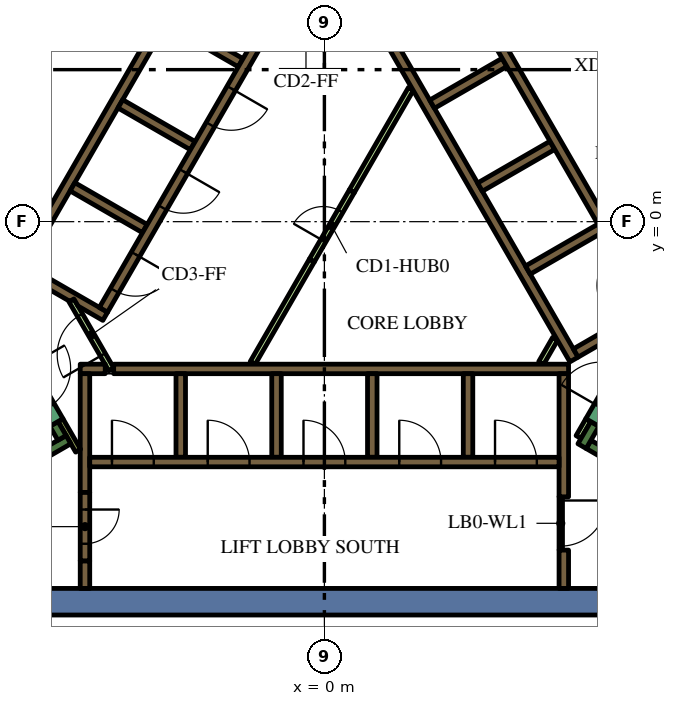
"""IFC4 building model, lengths in metres.
Left out: names, types, materials, properties, quantities, classifications, styles, units other than length and angle.
Written with IfcOpenShell. Run it as: python <this file> out.ifc"""

import sys

from ifc_helpers import new_model, si_unit, direction, frame, frame_2d, origin, place, context, subcontext, project, spatial, polyline, rectangle, outline, extrude, element, fill, save


model = new_model("IFC4")
c1 = context("Model", 3, precision=1e-05, world=origin(), true_north=direction((0.0, 1.0)))
c2 = subcontext(c1, "Body", "Model", "MODEL_VIEW")
j1 = project(units=[si_unit("LENGTHUNIT", "METRE"), si_unit("PLANEANGLEUNIT", "RADIAN")], contexts=[c1])
p1 = place(None, origin())
s1 = spatial("IfcSite", under=j1, at=p1, CompositionType="ELEMENT")
p2 = place(p1, origin())
s2 = spatial("IfcBuilding", under=s1, at=p2, CompositionType="ELEMENT")
p3 = place(p2, frame((0.0, 0.0, 231.0)))
s3 = spatial("IfcBuildingStorey", under=s2, at=p3, CompositionType="ELEMENT", Elevation=231.0)
p4 = place(p3, frame((8.904, -10.0, 0.0), z_axis=(0.0, 0.0, 1.0), x_axis=(-1.0, 0.0, 0.0)))
e1 = element("IfcWall", 1, at=p4, inside=s3, PredefinedType="SOLIDWALL", context=c2, shape_type="SweptSolid", body=[
    extrude(rectangle(XDim=22.226, YDim=0.7, at=frame_2d((11.113, 0.0))), origin(), (0.0, 0.0, 1.0), 4.2),
])
p5 = place(p3, frame((-12.625, -1.867, 0.0), z_axis=(0.0, 0.0, 1.0), x_axis=(0.500008520515, 0.866020484407, 0.0)))
e2 = element("IfcWall", 2, at=p5, inside=s3, PredefinedType="SOLIDWALL", context=c2, shape_type="SweptSolid", body=[
    extrude(rectangle(XDim=15.859, YDim=0.7, at=frame_2d((7.929, 0.0))), origin(), (0.0, 0.0, 1.0), 4.2),
])
p6 = place(p3, frame((12.84, -9.261, 0.0), z_axis=(0.0, 0.0, 1.0), x_axis=(-0.866013990052, 0.500019768644, 0.0)))
e3 = element("IfcWall", 3, at=p6, inside=s3, PredefinedType="SOLIDWALL", context=c2, shape_type="SweptSolid", body=[
    extrude(rectangle(XDim=6.8, YDim=0.25, at=frame_2d((3.4, 0.0))), origin(), (0.0, 0.0, 1.0), 4.2),
])
p7 = place(p3, frame((6.78, -5.906, 0.0), z_axis=(0.0, 0.0, 1.0), x_axis=(0.500223362819, 0.865896406789, 0.0)))
e4 = element("IfcWall", 4, at=p7, inside=s3, PredefinedType="SOLIDWALL", context=c2, shape_type="SweptSolid", body=[
    extrude(rectangle(XDim=0.675, YDim=0.25, at=frame_2d((0.337, 0.0))), origin(), (0.0, 0.0, 1.0), 4.2),
])
p8 = place(p3, frame((-12.84, -9.261, 0.0), z_axis=(0.0, 0.0, 1.0), x_axis=(0.866016039709, 0.500016218704, 0.0)))
e5 = element("IfcWall", 5, at=p8, inside=s3, PredefinedType="SOLIDWALL", context=c2, shape_type="SweptSolid", body=[
    extrude(rectangle(XDim=7.05, YDim=0.25, at=frame_2d((3.525, 0.0))), origin(), (0.0, 0.0, 1.0), 4.2),
])
p9 = place(p3, frame((-6.905, -5.69, 0.0), z_axis=(0.0, 0.0, 1.0), x_axis=(-0.500402024738, 0.865793170242, 0.0)))
e6 = element("IfcWall", 6, at=p9, inside=s3, PredefinedType="SOLIDWALL", context=c2, shape_type="SweptSolid", body=[
    extrude(rectangle(XDim=0.425, YDim=0.25, at=frame_2d((0.212, 0.0))), origin(), (0.0, 0.0, 1.0), 4.2),
])
p10 = place(p3, frame((-6.3, -8.925, 0.0), z_axis=(0.0, 0.0, 1.0), x_axis=(0.0, -1.0, 0.0)))
e7 = element("IfcWall", 7, at=p10, inside=s3, PredefinedType="SOLIDWALL", context=c2, shape_type="SweptSolid", body=[
    extrude(rectangle(XDim=0.725, YDim=0.25, at=frame_2d((0.363, 0.0))), origin(), (0.0, 0.0, 1.0), 4.2),
])
p11 = place(p3, frame((-5.545, -3.875, 0.0), z_axis=(0.0, 0.0, 1.0), x_axis=(1.0, 0.0, 0.0)))
e8 = element("IfcWall", 8, at=p11, inside=s3, PredefinedType="SOLIDWALL", context=c2, shape_type="SweptSolid", body=[
    extrude(rectangle(XDim=11.97, YDim=0.25, at=frame_2d((5.985, 0.0))), origin(), (0.0, 0.0, 1.0), 4.2),
])
p12 = place(p3, frame((-6.425, -3.875, 0.0), z_axis=(0.0, 0.0, 1.0), x_axis=(1.0, 0.0, 0.0)))
e9 = element("IfcWall", 9, at=p12, inside=s3, PredefinedType="SOLIDWALL", context=c2, shape_type="SweptSolid", body=[
    extrude(rectangle(XDim=0.658, YDim=0.25, at=frame_2d((0.329, 0.0))), origin(), (0.0, 0.0, 1.0), 4.2),
])
p13 = place(p3, frame((6.3, -7.24, 0.0), z_axis=(0.0, 0.0, 1.0), x_axis=(0.0, 1.0, 0.0)))
e10 = element("IfcWall", 10, at=p13, inside=s3, PredefinedType="SOLIDWALL", context=c2, shape_type="SweptSolid", body=[
    extrude(rectangle(XDim=3.24, YDim=0.25, at=frame_2d((1.62, 0.0))), origin(), (0.0, 0.0, 1.0), 4.2),
])
p14 = place(p3, frame((6.3, -9.65, 0.0), z_axis=(0.0, 0.0, 1.0), x_axis=(0.0, 1.0, 0.0)))
e11 = element("IfcWall", 11, at=p14, inside=s3, PredefinedType="SOLIDWALL", context=c2, shape_type="SweptSolid", body=[
    extrude(rectangle(XDim=1.008, YDim=0.25, at=frame_2d((0.504, 0.0))), origin(), (0.0, 0.0, 1.0), 4.2),
])
for number, where, z_axis, x_axis in (
    (12, (3.78, -4.0, 0.0), (0.0, 0.0, 1.0), (0.0, -1.0, 0.0)),
    (13, (1.26, -4.0, 0.0), (0.0, 0.0, 1.0), (0.0, -1.0, 0.0)),
    (14, (-1.26, -4.0, 0.0), (0.0, 0.0, 1.0), (0.0, -1.0, 0.0)),
    (15, (-3.78, -4.0, 0.0), (0.0, 0.0, 1.0), (0.0, -1.0, 0.0)),
):
    element("IfcWall", number, at=place(p3, frame(where, z_axis=z_axis, x_axis=x_axis)), inside=s3, PredefinedType="SOLIDWALL", context=c2, shape_type="SweptSolid", body=[
        extrude(rectangle(XDim=2.2, YDim=0.25, at=frame_2d((1.1, 0.0))), origin(), (0.0, 0.0, 1.0), 4.2),
    ])
p15 = place(p3, frame((-6.3, -7.125, 0.0), z_axis=(0.0, 0.0, 1.0), x_axis=(0.0, 1.0, 0.0)))
e16 = element("IfcWall", 16, at=p15, inside=s3, PredefinedType="SOLIDWALL", context=c2, shape_type="SweptSolid", body=[
    extrude(rectangle(XDim=3.125, YDim=0.25, at=frame_2d((1.562, 0.0))), origin(), (0.0, 0.0, 1.0), 4.2),
])
p16 = place(p3, frame((6.568, -3.627, 0.0), z_axis=(0.0, 0.0, 1.0), x_axis=(-0.499999455981, 0.866025717874, 0.0)))
e17 = element("IfcWall", 17, at=p16, inside=s3, PredefinedType="SOLIDWALL", context=c2, shape_type="SweptSolid", body=[
    extrude(rectangle(XDim=11.978, YDim=0.25, at=frame_2d((5.989, 0.0))), origin(), (0.0, 0.0, 1.0), 4.2),
])
for number, where, z_axis, x_axis in (
    (18, (2.834, 3.091, 0.0), (0.0, 0.0, 1.0), (0.866, 0.5, 0.0)),
    (19, (4.094, 0.909, 0.0), (0.0, 0.0, 1.0), (0.866, 0.5, 0.0)),
    (20, (5.354, -1.274, 0.0), (0.0, 0.0, 1.0), (0.866, 0.5, 0.0)),
):
    element("IfcWall", number, at=place(p3, frame(where, z_axis=z_axis, x_axis=x_axis)), inside=s3, PredefinedType="SOLIDWALL", context=c2, shape_type="SweptSolid", body=[
        extrude(rectangle(XDim=2.2, YDim=0.25, at=frame_2d((1.1, 0.0))), origin(), (0.0, 0.0, 1.0), 4.2),
    ])
p17 = place(p3, frame((6.614, -3.456, 0.0), z_axis=(0.0, 0.0, 1.0), x_axis=(0.866032512851, 0.499987686533, 0.0)))
e21 = element("IfcWall", 21, at=p17, inside=s3, PredefinedType="SOLIDWALL", context=c2, shape_type="SweptSolid", body=[
    extrude(rectangle(XDim=2.975, YDim=0.25, at=frame_2d((1.487, 0.0))), origin(), (0.0, 0.0, 1.0), 4.2),
])
p18 = place(p3, frame((-8.06, -1.311, 0.0), z_axis=(0.0, 0.0, 1.0), x_axis=(0.50000273126, 0.866023826885, 0.0)))
e22 = element("IfcWall", 22, at=p18, inside=s3, PredefinedType="SOLIDWALL", context=c2, shape_type="SweptSolid", body=[
    extrude(rectangle(XDim=10.33, YDim=0.25, at=frame_2d((5.165, 0.0))), origin(), (0.0, 0.0, 1.0), 4.2),
])
for number, where, z_axis, x_axis in (
    (23, (-2.204, 4.182, 0.0), (0.0, 0.0, 1.0), (-0.866, 0.5, 0.0)),
    (24, (-5.369, 3.1, 0.0), (0.0, 0.0, 1.0), (0.866, -0.5, 0.0)),
    (25, (-4.724, -0.182, 0.0), (0.0, 0.0, 1.0), (-0.866, 0.5, 0.0)),
):
    element("IfcWall", number, at=place(p3, frame(where, z_axis=z_axis, x_axis=x_axis)), inside=s3, PredefinedType="SOLIDWALL", context=c2, shape_type="SweptSolid", body=[
        extrude(rectangle(XDim=2.2, YDim=0.25, at=frame_2d((1.1, 0.0))), origin(), (0.0, 0.0, 1.0), 4.2),
    ])
p19 = place(p3, origin())
e26 = element("IfcWall", 26, at=p19, inside=s3, PredefinedType="SOLIDWALL", context=c2, shape_type="SweptSolid", body=[
    extrude(outline(polyline([(-5.922, -2.257), (-5.922, -2.257), (-5.705, -2.382), (-5.83, -2.598), (-6.483, -2.221), (-6.591, -2.033), (-6.591, -2.033), (-6.7, -2.096), (-7.952, -1.373), (-7.827, -1.156), (-5.922, -2.257)])), origin(), (0.0, 0.0, 1.0), 4.2),
])
p20 = place(p3, frame((-6.48, -6.027, 0.0), z_axis=(0.0, 0.0, 1.0), x_axis=(-0.499927229454, 0.866067413802, 0.0)))
e27 = element("IfcWall", 27, at=p20, inside=s3, PredefinedType="PARTITIONING", context=c2, shape_type="SweptSolid", body=[
    extrude(rectangle(XDim=0.929, YDim=0.15, at=frame_2d((0.464, 0.0))), origin(), (0.0, 0.0, 1.0), 4.2),
])
p21 = place(p3, frame((6.945, -5.222, 0.0), z_axis=(0.0, 0.0, 1.0), x_axis=(-0.499818422106, -0.866130212453, 0.0)))
e28 = element("IfcWall", 28, at=p21, inside=s3, PredefinedType="PARTITIONING", context=c2, shape_type="SweptSolid", body=[
    extrude(rectangle(XDim=0.514, YDim=0.15, at=frame_2d((0.257, 0.0))), origin(), (0.0, 0.0, 1.0), 3.45),
])
p22 = place(p3, frame((5.705, -3.718, 0.0), z_axis=(0.0, 0.0, 1.0), x_axis=(0.499962090823, 0.866047289552, 0.0)))
e29 = element("IfcWall", 29, at=p22, inside=s3, PredefinedType="PARTITIONING", context=c2, shape_type="SweptSolid", body=[
    extrude(rectangle(XDim=0.735, YDim=0.15, at=frame_2d((0.367, 0.0))), origin(), (0.0, 0.0, 1.0), 3.45),
])
p23 = place(p3, frame((-1.887, -3.718, 0.0), z_axis=(0.0, 0.0, 1.0), x_axis=(0.500043732237, 0.866000153493, 0.0)))
e30 = element("IfcWall", 30, at=p23, inside=s3, PredefinedType="PARTITIONING", context=c2, shape_type="SweptSolid", body=[
    extrude(rectangle(XDim=3.114, YDim=0.15, at=frame_2d((1.557, 0.0))), origin(), (0.0, 0.0, 1.0), 3.45),
])
p24 = place(p3, frame((0.72, 0.797, 0.0), z_axis=(0.0, 0.0, 1.0), x_axis=(0.499984921984, 0.866034108906, 0.0)))
e31 = element("IfcWall", 31, at=p24, inside=s3, PredefinedType="PARTITIONING", context=c2, shape_type="SweptSolid", body=[
    extrude(rectangle(XDim=3.113, YDim=0.15, at=frame_2d((1.557, 0.0))), origin(), (0.0, 0.0, 1.0), 3.45),
])
p25 = place(p3, frame((-6.175, -6.325, 0.0), z_axis=(0.0, 0.0, 1.0), x_axis=(1.0, 0.0, 0.0)))
e32 = element("IfcWall", 32, at=p25, inside=s3, PredefinedType="SOLIDWALL", context=c2, shape_type="SweptSolid", body=[
    extrude(rectangle(XDim=12.35, YDim=0.25, at=frame_2d((6.175, 0.0))), origin(), (0.0, 0.0, 1.0), 4.2),
])
p26 = place(p25, frame((0.585, 0.0, 0.0)))
e33 = element("IfcOpeningElement", 33, at=p26, cuts=e32, PredefinedType="OPENING", context=c2, shape_type="SweptSolid", body=[
    extrude(rectangle(XDim=1.1, YDim=2.1, at=frame_2d((0.55, 1.05))), frame((0.0, 0.135, 0.0), z_axis=(0.0, -1.0, 0.0), x_axis=(1.0, 0.0, 0.0)), (0.0, 0.0, 1.0), 0.27),
])
p27 = place(p25, frame((3.105, 0.0, 0.0)))
e34 = element("IfcOpeningElement", 34, at=p27, cuts=e32, PredefinedType="OPENING", context=c2, shape_type="SweptSolid", body=[
    extrude(rectangle(XDim=1.1, YDim=2.1, at=frame_2d((0.55, 1.05))), frame((0.0, 0.135, 0.0), z_axis=(0.0, -1.0, 0.0), x_axis=(1.0, 0.0, 0.0)), (0.0, 0.0, 1.0), 0.27),
])
p28 = place(p25, frame((5.625, 0.0, 0.0)))
e35 = element("IfcOpeningElement", 35, at=p28, cuts=e32, PredefinedType="OPENING", context=c2, shape_type="SweptSolid", body=[
    extrude(rectangle(XDim=1.1, YDim=2.1, at=frame_2d((0.55, 1.05))), frame((0.0, 0.135, 0.0), z_axis=(0.0, -1.0, 0.0), x_axis=(1.0, 0.0, 0.0)), (0.0, 0.0, 1.0), 0.27),
])
p29 = place(p25, frame((8.145, 0.0, 0.0)))
e36 = element("IfcOpeningElement", 36, at=p29, cuts=e32, PredefinedType="OPENING", context=c2, shape_type="SweptSolid", body=[
    extrude(rectangle(XDim=1.1, YDim=2.1, at=frame_2d((0.55, 1.05))), frame((0.0, 0.135, 0.0), z_axis=(0.0, -1.0, 0.0), x_axis=(1.0, 0.0, 0.0)), (0.0, 0.0, 1.0), 0.27),
])
p30 = place(p25, frame((10.665, 0.0, 0.0)))
e37 = element("IfcOpeningElement", 37, at=p30, cuts=e32, PredefinedType="OPENING", context=c2, shape_type="SweptSolid", body=[
    extrude(rectangle(XDim=1.1, YDim=2.1, at=frame_2d((0.55, 1.05))), frame((0.0, 0.135, 0.0), z_axis=(0.0, -1.0, 0.0), x_axis=(1.0, 0.0, 0.0)), (0.0, 0.0, 1.0), 0.27),
])
p31 = place(p3, frame((8.565, -2.185, 0.0), z_axis=(0.0, 0.0, 1.0), x_axis=(-0.499997954832, 0.866026584559, 0.0)))
e38 = element("IfcWall", 38, at=p31, inside=s3, PredefinedType="SOLIDWALL", context=c2, shape_type="SweptSolid", body=[
    extrude(rectangle(XDim=12.35, YDim=0.25, at=frame_2d((6.175, 0.0))), origin(), (0.0, 0.0, 1.0), 4.2),
])
p32 = place(p31, frame((0.585, 0.0, 0.0)))
e39 = element("IfcOpeningElement", 39, at=p32, cuts=e38, PredefinedType="OPENING", context=c2, shape_type="SweptSolid", body=[
    extrude(rectangle(XDim=1.1, YDim=2.1, at=frame_2d((0.55, 1.05))), frame((0.0, 0.135, 0.0), z_axis=(0.0, -1.0, 0.0), x_axis=(1.0, 0.0, 0.0)), (0.0, 0.0, 1.0), 0.27),
])
p33 = place(p3, frame((-0.898, 6.194, 0.0), z_axis=(0.0, 0.0, 1.0), x_axis=(-0.499996202215, -0.866027596426, 0.0)))
e40 = element("IfcWall", 40, at=p33, inside=s3, PredefinedType="SOLIDWALL", context=c2, shape_type="SweptSolid", body=[
    extrude(rectangle(XDim=9.83, YDim=0.25, at=frame_2d((4.915, 0.0))), origin(), (0.0, 0.0, 1.0), 4.2),
])
p34 = place(p33, frame((0.585, 0.0, 0.0)))
e41 = element("IfcOpeningElement", 41, at=p34, cuts=e40, PredefinedType="OPENING", context=c2, shape_type="SweptSolid", body=[
    extrude(rectangle(XDim=1.1, YDim=2.1, at=frame_2d((0.55, 1.05))), frame((0.0, 0.135, 0.0), z_axis=(0.0, -1.0, 0.0), x_axis=(1.0, 0.0, 0.0)), (0.0, 0.0, 1.0), 0.27),
])
p35 = place(p33, frame((3.105, 0.0, 0.0)))
e42 = element("IfcOpeningElement", 42, at=p35, cuts=e40, PredefinedType="OPENING", context=c2, shape_type="SweptSolid", body=[
    extrude(rectangle(XDim=1.1, YDim=2.1, at=frame_2d((0.55, 1.05))), frame((0.0, 0.135, 0.0), z_axis=(0.0, -1.0, 0.0), x_axis=(1.0, 0.0, 0.0)), (0.0, 0.0, 1.0), 0.27),
])
p36 = place(p33, frame((5.625, 0.0, 0.0)))
e43 = element("IfcOpeningElement", 43, at=p36, cuts=e40, PredefinedType="OPENING", context=c2, shape_type="SweptSolid", body=[
    extrude(rectangle(XDim=1.1, YDim=2.1, at=frame_2d((0.55, 1.05))), frame((0.0, 0.135, 0.0), z_axis=(0.0, -1.0, 0.0), x_axis=(1.0, 0.0, 0.0)), (0.0, 0.0, 1.0), 0.27),
])
p37 = place(p33, frame((8.145, 0.0, 0.0)))
e44 = element("IfcOpeningElement", 44, at=p37, cuts=e40, PredefinedType="OPENING", context=c2, shape_type="SweptSolid", body=[
    extrude(rectangle(XDim=1.1, YDim=2.1, at=frame_2d((0.55, 1.05))), frame((0.0, 0.135, 0.0), z_axis=(0.0, -1.0, 0.0), x_axis=(1.0, 0.0, 0.0)), (0.0, 0.0, 1.0), 0.27),
])
p38 = place(p3, frame((7.053, -5.284, 0.0), z_axis=(0.0, 0.0, 1.0), x_axis=(0.500078061341, 0.865980330357, 0.0)))
e45 = element("IfcWall", 45, at=p38, inside=s3, PredefinedType="SOLIDWALL", context=c2, shape_type="SweptSolid", body=[
    extrude(rectangle(XDim=2.1, YDim=0.4, at=frame_2d((1.05, 0.0))), origin(), (0.0, 0.0, 1.0), 4.2),
])
p39 = place(p38, frame((0.45, 0.0, 0.0)))
e46 = element("IfcOpeningElement", 46, at=p39, cuts=e45, PredefinedType="OPENING", context=c2, shape_type="SweptSolid", body=[
    extrude(rectangle(XDim=1.2, YDim=2.1, at=frame_2d((0.6, 1.05))), frame((0.0, 0.21, 0.0), z_axis=(0.0, -1.0, 0.0), x_axis=(1.0, 0.0, 0.0)), (0.0, 0.0, 1.0), 0.42),
])
p40 = place(p3, frame((-8.103, -3.466, 0.0), z_axis=(0.0, 0.0, 1.0), x_axis=(0.500078061341, -0.865980330357, 0.0)))
e47 = element("IfcWall", 47, at=p40, inside=s3, PredefinedType="SOLIDWALL", context=c2, shape_type="SweptSolid", body=[
    extrude(rectangle(XDim=2.1, YDim=0.4, at=frame_2d((1.05, 0.0))), origin(), (0.0, 0.0, 1.0), 4.2),
])
p41 = place(p40, frame((0.45, 0.0, 0.0)))
e48 = element("IfcOpeningElement", 48, at=p41, cuts=e47, PredefinedType="OPENING", context=c2, shape_type="SweptSolid", body=[
    extrude(rectangle(XDim=1.2, YDim=2.1, at=frame_2d((0.6, 1.05))), frame((0.0, 0.21, 0.0), z_axis=(0.0, -1.0, 0.0), x_axis=(1.0, 0.0, 0.0)), (0.0, 0.0, 1.0), 0.42),
])
p42 = place(p3, frame((-6.3, -7.125, 0.0), z_axis=(0.0, 0.0, 1.0), x_axis=(0.0, -1.0, 0.0)))
e49 = element("IfcWall", 49, at=p42, inside=s3, PredefinedType="SOLIDWALL", context=c2, shape_type="SweptSolid", body=[
    extrude(rectangle(XDim=1.8, YDim=0.25, at=frame_2d((0.9, 0.0))), origin(), (0.0, 0.0, 1.0), 4.2),
])
p43 = place(p42, frame((0.45, 0.0, 0.0)))
e50 = element("IfcOpeningElement", 50, at=p43, cuts=e49, PredefinedType="OPENING", context=c2, shape_type="SweptSolid", body=[
    extrude(rectangle(XDim=0.9, YDim=2.1, at=frame_2d((0.45, 1.05))), frame((0.0, 0.135, 0.0), z_axis=(0.0, -1.0, 0.0), x_axis=(1.0, 0.0, 0.0)), (0.0, 0.0, 1.0), 0.27),
])
p44 = place(p3, frame((-0.33, -1.022, 0.0), z_axis=(0.0, 0.0, 1.0), x_axis=(0.500027713859, 0.866009402589, 0.0)))
e51 = element("IfcWall", 51, at=p44, inside=s3, PredefinedType="PARTITIONING", context=c2, shape_type="SweptSolid", body=[
    extrude(rectangle(XDim=2.1, YDim=0.15, at=frame_2d((1.05, 0.0))), origin(), (0.0, 0.0, 1.0), 3.45),
])
p45 = place(p44, frame((0.6, 0.0, 0.0)))
e52 = element("IfcOpeningElement", 52, at=p45, cuts=e51, PredefinedType="OPENING", context=c2, shape_type="SweptSolid", body=[
    extrude(rectangle(XDim=0.9, YDim=2.1, at=frame_2d((0.45, 1.05))), frame((0.0, 0.085, 0.0), z_axis=(0.0, -1.0, 0.0), x_axis=(1.0, 0.0, 0.0)), (0.0, 0.0, 1.0), 0.17),
])
p46 = place(p3, frame((-5.606, -3.89, 0.0), z_axis=(0.0, 0.0, 1.0), x_axis=(-0.500027713859, 0.866009402589, 0.0)))
e53 = element("IfcWall", 53, at=p46, inside=s3, PredefinedType="PARTITIONING", context=c2, shape_type="SweptSolid", body=[
    extrude(rectangle(XDim=2.1, YDim=0.15, at=frame_2d((1.05, 0.0))), origin(), (0.0, 0.0, 1.0), 3.45),
])
p47 = place(p46, frame((0.45, 0.0, 0.0)))
e54 = element("IfcOpeningElement", 54, at=p47, cuts=e53, PredefinedType="OPENING", context=c2, shape_type="SweptSolid", body=[
    extrude(rectangle(XDim=1.2, YDim=2.1, at=frame_2d((0.6, 1.05))), frame((0.0, 0.085, 0.0), z_axis=(0.0, -1.0, 0.0), x_axis=(1.0, 0.0, 0.0)), (0.0, 0.0, 1.0), 0.17),
])
p48 = place(p3, frame((6.22, -7.237, 0.0), z_axis=(0.0, 0.0, 1.0), x_axis=(0.0, -1.0, 0.0)))
e55 = element("IfcWall", 55, at=p48, inside=s3, PredefinedType="PARTITIONING", context=c2, shape_type="SweptSolid", body=[
    extrude(rectangle(XDim=1.4, YDim=0.09, at=frame_2d((0.7, 0.0))), origin(), (0.0, 0.0, 1.0), 3.45),
])
p49 = place(p48, frame((0.1, 0.0, 0.0)))
e56 = element("IfcOpeningElement", 56, at=p49, cuts=e55, PredefinedType="OPENING", context=c2, shape_type="SweptSolid", body=[
    extrude(rectangle(XDim=1.2, YDim=2.1, at=frame_2d((0.6, 1.05))), frame((0.0, 0.055, 0.0), z_axis=(0.0, -1.0, 0.0), x_axis=(1.0, 0.0, 0.0)), (0.0, 0.0, 1.0), 0.11),
])
p50 = place(p26, origin())
e57 = element("IfcDoor", 57, at=p50, inside=s3, OperationType="DOUBLE_DOOR_SLIDING", PredefinedType="DOOR", context=c2, shape_type="SweptSolid", body=[
    extrude(rectangle(XDim=1.1, YDim=2.1, at=frame_2d((0.55, 1.05))), frame((0.0, 0.025, 0.0), z_axis=(0.0, -1.0, 0.0), x_axis=(1.0, 0.0, 0.0)), (0.0, 0.0, 1.0), 0.05),
])
fill(e33, e57)
p51 = place(p27, origin())
e58 = element("IfcDoor", 58, at=p51, inside=s3, OperationType="DOUBLE_DOOR_SLIDING", PredefinedType="DOOR", context=c2, shape_type="SweptSolid", body=[
    extrude(rectangle(XDim=1.1, YDim=2.1, at=frame_2d((0.55, 1.05))), frame((0.0, 0.025, 0.0), z_axis=(0.0, -1.0, 0.0), x_axis=(1.0, 0.0, 0.0)), (0.0, 0.0, 1.0), 0.05),
])
fill(e34, e58)
p52 = place(p28, origin())
e59 = element("IfcDoor", 59, at=p52, inside=s3, OperationType="DOUBLE_DOOR_SLIDING", PredefinedType="DOOR", context=c2, shape_type="SweptSolid", body=[
    extrude(rectangle(XDim=1.1, YDim=2.1, at=frame_2d((0.55, 1.05))), frame((0.0, 0.025, 0.0), z_axis=(0.0, -1.0, 0.0), x_axis=(1.0, 0.0, 0.0)), (0.0, 0.0, 1.0), 0.05),
])
fill(e35, e59)
p53 = place(p29, origin())
e60 = element("IfcDoor", 60, at=p53, inside=s3, OperationType="DOUBLE_DOOR_SLIDING", PredefinedType="DOOR", context=c2, shape_type="SweptSolid", body=[
    extrude(rectangle(XDim=1.1, YDim=2.1, at=frame_2d((0.55, 1.05))), frame((0.0, 0.025, 0.0), z_axis=(0.0, -1.0, 0.0), x_axis=(1.0, 0.0, 0.0)), (0.0, 0.0, 1.0), 0.05),
])
fill(e36, e60)
p54 = place(p30, origin())
e61 = element("IfcDoor", 61, at=p54, inside=s3, OperationType="DOUBLE_DOOR_SLIDING", PredefinedType="DOOR", context=c2, shape_type="SweptSolid", body=[
    extrude(rectangle(XDim=1.1, YDim=2.1, at=frame_2d((0.55, 1.05))), frame((0.0, 0.025, 0.0), z_axis=(0.0, -1.0, 0.0), x_axis=(1.0, 0.0, 0.0)), (0.0, 0.0, 1.0), 0.05),
])
fill(e37, e61)
p55 = place(p35, origin())
e62 = element("IfcDoor", 62, at=p55, inside=s3, OperationType="DOUBLE_DOOR_SLIDING", PredefinedType="DOOR", context=c2, shape_type="SweptSolid", body=[
    extrude(rectangle(XDim=1.1, YDim=2.1, at=frame_2d((0.55, 1.05))), frame((0.0, 0.025, 0.0), z_axis=(0.0, -1.0, 0.0), x_axis=(1.0, 0.0, 0.0)), (0.0, 0.0, 1.0), 0.05),
])
fill(e42, e62)
p56 = place(p36, origin())
e63 = element("IfcDoor", 63, at=p56, inside=s3, OperationType="DOUBLE_DOOR_SLIDING", PredefinedType="DOOR", context=c2, shape_type="SweptSolid", body=[
    extrude(rectangle(XDim=1.1, YDim=2.1, at=frame_2d((0.55, 1.05))), frame((0.0, 0.025, 0.0), z_axis=(0.0, -1.0, 0.0), x_axis=(1.0, 0.0, 0.0)), (0.0, 0.0, 1.0), 0.05),
])
fill(e43, e63)
p57 = place(p37, origin())
e64 = element("IfcDoor", 64, at=p57, inside=s3, OperationType="DOUBLE_DOOR_SLIDING", PredefinedType="DOOR", context=c2, shape_type="SweptSolid", body=[
    extrude(rectangle(XDim=1.1, YDim=2.1, at=frame_2d((0.55, 1.05))), frame((0.0, 0.025, 0.0), z_axis=(0.0, -1.0, 0.0), x_axis=(1.0, 0.0, 0.0)), (0.0, 0.0, 1.0), 0.05),
])
fill(e44, e64)
p58 = place(p43, origin())
e65 = element("IfcDoor", 65, at=p58, inside=s3, OperationType="SINGLE_SWING_LEFT", PredefinedType="DOOR", context=c2, shape_type="SweptSolid", body=[
    extrude(rectangle(XDim=0.9, YDim=2.1, at=frame_2d((0.45, 1.05))), frame((0.0, 0.025, 0.0), z_axis=(0.0, -1.0, 0.0), x_axis=(1.0, 0.0, 0.0)), (0.0, 0.0, 1.0), 0.05),
])
fill(e50, e65)
p59 = place(p45, origin())
e66 = element("IfcDoor", 66, at=p59, inside=s3, OperationType="SINGLE_SWING_LEFT", PredefinedType="DOOR", context=c2, shape_type="SweptSolid", body=[
    extrude(rectangle(XDim=0.9, YDim=2.1, at=frame_2d((0.45, 1.05))), frame((0.0, 0.025, 0.0), z_axis=(0.0, -1.0, 0.0), x_axis=(1.0, 0.0, 0.0)), (0.0, 0.0, 1.0), 0.05),
])
fill(e52, e66)
p60 = place(p47, origin())
e67 = element("IfcDoor", 67, at=p60, inside=s3, OperationType="SINGLE_SWING_LEFT", PredefinedType="DOOR", context=c2, shape_type="SweptSolid", body=[
    extrude(rectangle(XDim=1.2, YDim=2.1, at=frame_2d((0.6, 1.05))), frame((0.0, 0.025, 0.0), z_axis=(0.0, -1.0, 0.0), x_axis=(1.0, 0.0, 0.0)), (0.0, 0.0, 1.0), 0.05),
])
fill(e54, e67)
p61 = place(p49, origin())
e68 = element("IfcDoor", 68, at=p61, inside=s3, OperationType="SINGLE_SWING_LEFT", PredefinedType="DOOR", context=c2, shape_type="SweptSolid", body=[
    extrude(rectangle(XDim=1.2, YDim=2.1, at=frame_2d((0.6, 1.05))), frame((0.0, 0.025, 0.0), z_axis=(0.0, -1.0, 0.0), x_axis=(1.0, 0.0, 0.0)), (0.0, 0.0, 1.0), 0.05),
])
fill(e56, e68)
save(model, sys.argv[1])
